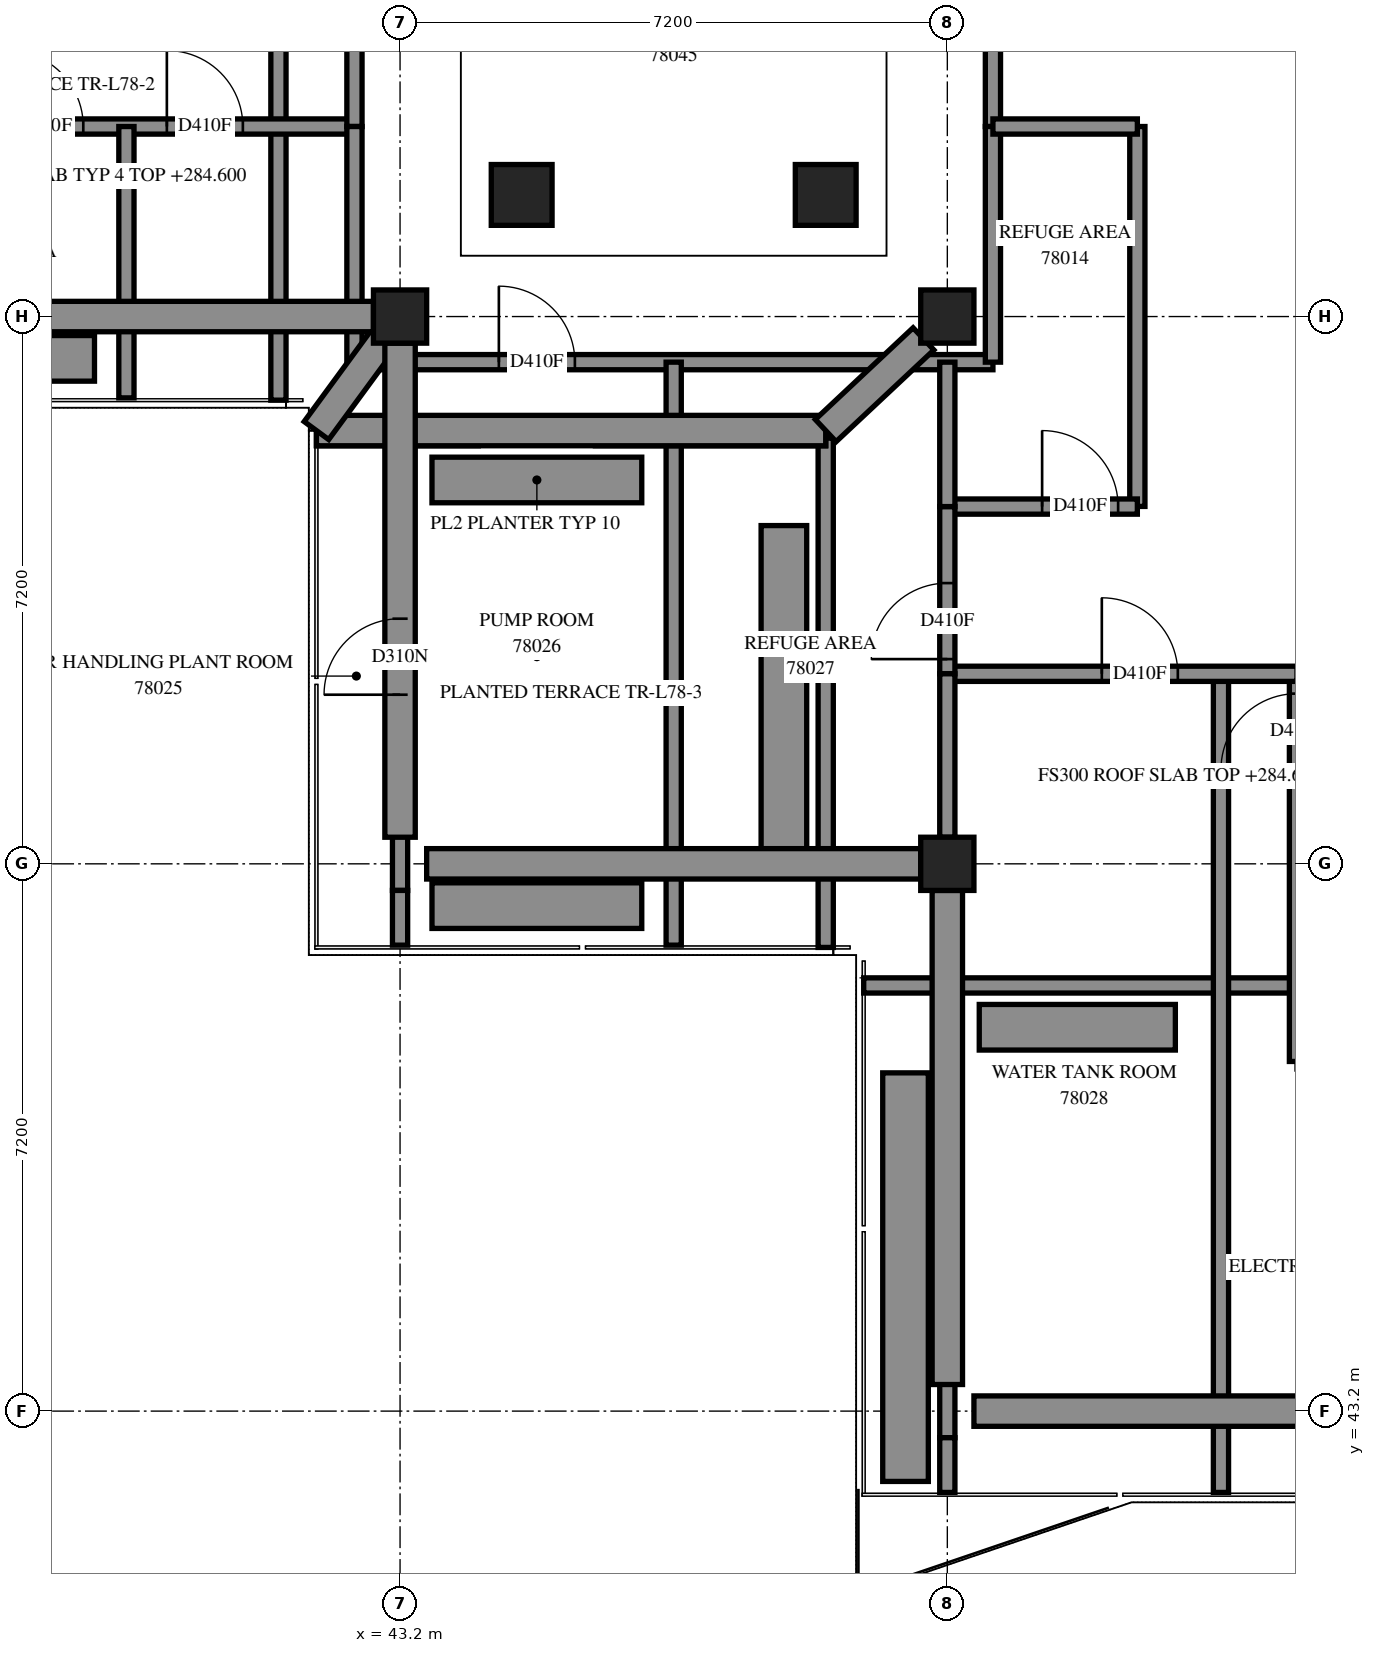
"""IFC4 building model, lengths in metres.
Left out: names, types, materials, properties, quantities, classifications, styles, units other than length and angle.
Written with IfcOpenShell. Run it as: python <this file> out.ifc"""

import sys

from ifc_helpers import new_model, si_unit, direction, frame, frame_2d, origin, origin_2d, place, context, subcontext, project, spatial, polyline, rectangle, outline, extrude, element, fill, save


model = new_model("IFC4")
c1 = context("Model", 3, precision=1e-05, world=origin(), true_north=direction((0.0, 1.0)))
c2 = subcontext(c1, "Body", "Model", "MODEL_VIEW")
j1 = project(units=[si_unit("LENGTHUNIT", "METRE"), si_unit("PLANEANGLEUNIT", "RADIAN")], contexts=[c1])
p1 = place(None, origin())
s1 = spatial("IfcSite", under=j1, at=p1, CompositionType="ELEMENT")
p2 = place(p1, origin())
s2 = spatial("IfcBuilding", under=s1, at=p2, CompositionType="ELEMENT")
p3 = place(p2, frame((0.0, 0.0, 284.6)))
s3 = spatial("IfcBuildingStorey", under=s2, at=p3, CompositionType="ELEMENT", Elevation=284.6)
for number, where, z_axis, x_axis in (
    (1, (43.2, 57.6, 0.0), (0.0, 0.0, 1.0), (1.0, 0.0, 0.0)),
    (2, (50.4, 50.4, 0.0), (0.0, 0.0, 1.0), (1.0, 0.0, 0.0)),
    (3, (50.4, 57.6, 0.0), (0.0, 0.0, 1.0), (1.0, 0.0, 0.0)),
):
    element("IfcColumn", number, at=place(p3, frame(where, z_axis=z_axis, x_axis=x_axis)), inside=s3, PredefinedType="COLUMN", context=c2, shape_type="SweptSolid", body=[
        extrude(rectangle(XDim=0.7, YDim=0.7, at=origin_2d()), origin(), (0.0, 0.0, 1.0), 5.7),
    ])
for number, where, z_axis, x_axis in (
    (4, (44.8, 59.2, 0.5), (0.0, 0.0, 1.0), (1.0, 0.0, 0.0)),
    (5, (48.8, 59.2, 0.5), (0.0, 0.0, 1.0), (1.0, 0.0, 0.0)),
):
    element("IfcColumn", number, at=place(p3, frame(where, z_axis=z_axis, x_axis=x_axis)), inside=s3, PredefinedType="COLUMN", context=c2, shape_type="SweptSolid", body=[
        extrude(rectangle(XDim=0.8, YDim=0.8, at=origin_2d()), origin(), (0.0, 0.0, 1.0), 2.6),
    ])
p4 = place(p3, frame((41.6, 56.5, 0.0), z_axis=(0.0, 0.0, 1.0), x_axis=(0.0, 1.0, 0.0)))
e6 = element("IfcWall", 6, at=p4, inside=s3, PredefinedType="PARAPET", context=c2, shape_type="SweptSolid", body=[
    extrude(outline(polyline([(0.0, -0.1), (6.8, -0.1), (6.6, 0.1), (0.0, 0.1), (0.0, -0.1)])), origin(), (0.0, 0.0, 1.0), 0.25),
])
p5 = place(p3, frame((36.42, 57.05, 0.0), z_axis=(0.0, 0.0, 1.0), x_axis=(1.0, 0.0, 0.0)))
e7 = element("IfcWall", 7, at=p5, inside=s3, PredefinedType="SOLIDWALL", context=c2, shape_type="SweptSolid", body=[
    extrude(rectangle(XDim=2.76, YDim=0.6, at=frame_2d((1.38, 0.0))), origin(), (0.0, 0.0, 1.0), 0.65),
])
p6 = place(p3, frame((48.8, 49.3, 0.0), z_axis=(0.0, 0.0, 1.0), x_axis=(0.0, 1.0, 0.0)))
e8 = element("IfcWall", 8, at=p6, inside=s3, PredefinedType="PARAPET", context=c2, shape_type="SweptSolid", body=[
    extrude(outline(polyline([(0.0, -0.1), (6.8, -0.1), (6.6, 0.1), (0.0, 0.1), (0.0, -0.1)])), origin(), (0.0, 0.0, 1.0), 0.25),
])
p7 = place(p3, frame((48.25, 50.45, 0.0), z_axis=(0.0, 0.0, 1.0), x_axis=(0.0, 1.0, 0.0)))
e9 = element("IfcWall", 9, at=p7, inside=s3, PredefinedType="SOLIDWALL", context=c2, shape_type="SweptSolid", body=[
    extrude(rectangle(XDim=4.4, YDim=0.6, at=frame_2d((2.2, 0.0))), origin(), (0.0, 0.0, 1.0), 0.65),
])
for number, where, z_axis, x_axis in (
    (10, (46.38, 55.45, 0.0), (0.0, 0.0, 1.0), (-1.0, 0.0, 0.0)),
    (11, (43.62, 49.85, 0.0), (0.0, 0.0, 1.0), (1.0, 0.0, 0.0)),
):
    element("IfcWall", number, at=place(p3, frame(where, z_axis=z_axis, x_axis=x_axis)), inside=s3, PredefinedType="SOLIDWALL", context=c2, shape_type="SweptSolid", body=[
        extrude(rectangle(XDim=2.76, YDim=0.6, at=frame_2d((1.38, 0.0))), origin(), (0.0, 0.0, 1.0), 0.65),
    ])
p8 = place(p3, frame((56.0, 48.8, 0.0), z_axis=(0.0, 0.0, 1.0), x_axis=(-1.0, 0.0, 0.0)))
e12 = element("IfcWall", 12, at=p8, inside=s3, PredefinedType="PARAPET", context=c2, shape_type="SweptSolid", body=[
    extrude(outline(polyline([(-0.1, -0.1), (6.7, -0.1), (6.7, 0.1), (0.1, 0.1), (-0.1, -0.1)])), origin(), (0.0, 0.0, 1.0), 0.25),
])
p9 = place(p3, frame((53.4, 48.25, 0.0), z_axis=(0.0, 0.0, 1.0), x_axis=(-1.0, 0.0, 0.0)))
e13 = element("IfcWall", 13, at=p9, inside=s3, PredefinedType="SOLIDWALL", context=c2, shape_type="SweptSolid", body=[
    extrude(rectangle(XDim=2.58, YDim=0.6, at=frame_2d((1.29, 0.0))), origin(), (0.0, 0.0, 1.0), 0.65),
])
p10 = place(p3, frame((49.85, 47.65, 0.0), z_axis=(0.0, 0.0, 1.0), x_axis=(0.0, -1.0, 0.0)))
e14 = element("IfcWall", 14, at=p10, inside=s3, PredefinedType="SOLIDWALL", context=c2, shape_type="SweptSolid", body=[
    extrude(rectangle(XDim=5.375, YDim=0.6, at=frame_2d((2.688, 0.0))), origin(), (0.0, 0.0, 1.0), 0.65),
])
p11 = place(p3, frame((54.0, 42.13, 0.0), z_axis=(0.0, 0.0, 1.0), x_axis=(0.0, 1.0, 0.0)))
e15 = element("IfcWall", 15, at=p11, inside=s3, PredefinedType="PARTITIONING", context=c2, shape_type="SweptSolid", body=[
    extrude(rectangle(XDim=10.77, YDim=0.2, at=frame_2d((5.385, 0.0))), origin(), (0.0, 0.0, 1.0), 5.7),
])
p12 = place(p3, frame((42.6, 57.0, 0.0), z_axis=(0.0, 0.0, 1.0), x_axis=(1.0, 0.0, 0.0)))
e16 = element("IfcWall", 16, at=p12, inside=s3, PredefinedType="PARTITIONING", context=c2, shape_type="SweptSolid", body=[
    extrude(rectangle(XDim=8.4, YDim=0.2, at=frame_2d((4.2, 0.0))), origin(), (0.0, 0.0, 1.0), 5.2),
])
p13 = place(p12, frame((1.9, 0.0, 0.0)))
e17 = element("IfcOpeningElement", 17, at=p13, cuts=e16, PredefinedType="OPENING", context=c2, shape_type="SweptSolid", body=[
    extrude(rectangle(XDim=1.0, YDim=2.1, at=frame_2d((0.5, 1.05))), frame((0.0, 0.11, 0.0), z_axis=(0.0, -1.0, 0.0), x_axis=(1.0, 0.0, 0.0)), (0.0, 0.0, 1.0), 0.22),
])
p14 = place(p3, frame((46.8, 49.33, 0.0), z_axis=(0.0, 0.0, 1.0), x_axis=(0.0, 1.0, 0.0)))
e18 = element("IfcWall", 18, at=p14, inside=s3, PredefinedType="PARTITIONING", context=c2, shape_type="SweptSolid", body=[
    extrude(rectangle(XDim=7.67, YDim=0.2, at=frame_2d((3.835, 0.0))), origin(), (0.0, 0.0, 1.0), 5.7),
])
p15 = place(p3, frame((36.0, 60.1, 0.0), z_axis=(0.0, 0.0, 1.0), x_axis=(1.0, 0.0, 0.0)))
e19 = element("IfcWall", 19, at=p15, inside=s3, PredefinedType="PARTITIONING", context=c2, shape_type="SweptSolid", body=[
    extrude(rectangle(XDim=6.6, YDim=0.2, at=frame_2d((3.3, 0.0))), origin(), (0.0, 0.0, 1.0), 5.7),
])
p16 = place(p15, frame((2.033, 0.0, 0.0)))
e20 = element("IfcOpeningElement", 20, at=p16, cuts=e19, PredefinedType="OPENING", context=c2, shape_type="SweptSolid", body=[
    extrude(rectangle(XDim=1.0, YDim=2.1, at=frame_2d((0.5, 1.05))), frame((0.0, 0.11, 0.0), z_axis=(0.0, -1.0, 0.0), x_axis=(1.0, 0.0, 0.0)), (0.0, 0.0, 1.0), 0.22),
])
p17 = place(p15, frame((4.132, 0.0, 0.0)))
e21 = element("IfcOpeningElement", 21, at=p17, cuts=e19, PredefinedType="OPENING", context=c2, shape_type="SweptSolid", body=[
    extrude(rectangle(XDim=1.0, YDim=2.1, at=frame_2d((0.5, 1.05))), frame((0.0, 0.11, 0.0), z_axis=(0.0, -1.0, 0.0), x_axis=(1.0, 0.0, 0.0)), (0.0, 0.0, 1.0), 0.22),
])
p18 = place(p3, frame((50.4, 42.85, 0.0), z_axis=(0.0, 0.0, 1.0), x_axis=(0.0, 1.0, 0.0)))
e22 = element("IfcWall", 22, at=p18, inside=s3, PredefinedType="PARTITIONING", context=c2, shape_type="SweptSolid", body=[
    extrude(rectangle(XDim=7.9, YDim=0.2, at=frame_2d((3.95, 0.0))), origin(), (0.0, 0.0, 1.0), 5.7),
])
p19 = place(p3, frame((43.2, 50.05, 0.0), z_axis=(0.0, 0.0, 1.0), x_axis=(0.0, 1.0, 0.0)))
e23 = element("IfcWall", 23, at=p19, inside=s3, PredefinedType="PARTITIONING", context=c2, shape_type="SweptSolid", body=[
    extrude(rectangle(XDim=6.95, YDim=0.2, at=frame_2d((3.475, 0.0))), origin(), (0.0, 0.0, 1.0), 5.7),
])
p20 = place(p19, frame((2.575, 0.0, 0.0)))
e24 = element("IfcOpeningElement", 24, at=p20, cuts=e23, PredefinedType="OPENING", context=c2, shape_type="SweptSolid", body=[
    extrude(rectangle(XDim=1.0, YDim=2.1, at=frame_2d((0.5, 1.05))), frame((0.0, 0.11, 0.0), z_axis=(0.0, -1.0, 0.0), x_axis=(1.0, 0.0, 0.0)), (0.0, 0.0, 1.0), 0.22),
])
p21 = place(p3, frame((51.0, 60.1, 0.0), z_axis=(0.0, 0.0, 1.0), x_axis=(0.0, 1.0, 0.0)))
e25 = element("IfcWall", 25, at=p21, inside=s3, PredefinedType="PARTITIONING", context=c2, shape_type="SweptSolid", body=[
    extrude(rectangle(XDim=5.3, YDim=0.2, at=frame_2d((2.65, 0.0))), origin(), (0.0, 0.0, 1.0), 5.7),
])
p22 = place(p3, frame((42.6, 60.1, 0.0), z_axis=(0.0, 0.0, 1.0), x_axis=(0.0, 1.0, 0.0)))
e26 = element("IfcWall", 26, at=p22, inside=s3, PredefinedType="PARTITIONING", context=c2, shape_type="SweptSolid", body=[
    extrude(rectangle(XDim=5.3, YDim=0.2, at=frame_2d((2.65, 0.0))), origin(), (0.0, 0.0, 1.0), 5.2),
])
p23 = place(p3, frame((55.0, 47.8, 0.0), z_axis=(0.0, 0.0, 1.0), x_axis=(0.0, 1.0, 0.0)))
e27 = element("IfcWall", 27, at=p23, inside=s3, PredefinedType="PARTITIONING", context=c2, shape_type="SweptSolid", body=[
    extrude(rectangle(XDim=5.1, YDim=0.2, at=frame_2d((2.55, 0.0))), origin(), (0.0, 0.0, 1.0), 5.7),
])
p24 = place(p23, frame((3.839, 0.0, 0.0)))
e28 = element("IfcOpeningElement", 28, at=p24, cuts=e27, PredefinedType="OPENING", context=c2, shape_type="SweptSolid", body=[
    extrude(rectangle(XDim=1.0, YDim=2.1, at=frame_2d((0.5, 1.05))), frame((0.0, 0.11, 0.0), z_axis=(0.0, -1.0, 0.0), x_axis=(1.0, 0.0, 0.0)), (0.0, 0.0, 1.0), 0.22),
])
p25 = place(p3, frame((52.9, 55.102, 0.0), z_axis=(0.0, 0.0, 1.0), x_axis=(0.0, 1.0, 0.0)))
e29 = element("IfcWall", 29, at=p25, inside=s3, PredefinedType="PARTITIONING", context=c2, shape_type="SweptSolid", body=[
    extrude(rectangle(XDim=4.998, YDim=0.2, at=frame_2d((2.499, 0.0))), origin(), (0.0, 0.0, 1.0), 5.7),
])
p26 = place(p3, frame((50.4, 52.9, 0.0), z_axis=(0.0, 0.0, 1.0), x_axis=(1.0, 0.0, 0.0)))
e30 = element("IfcWall", 30, at=p26, inside=s3, PredefinedType="PARTITIONING", context=c2, shape_type="SweptSolid", body=[
    extrude(rectangle(XDim=4.6, YDim=0.2, at=frame_2d((2.3, 0.0))), origin(), (0.0, 0.0, 1.0), 5.7),
])
p27 = place(p26, frame((2.033, 0.0, 0.0)))
e31 = element("IfcOpeningElement", 31, at=p27, cuts=e30, PredefinedType="OPENING", context=c2, shape_type="SweptSolid", body=[
    extrude(rectangle(XDim=1.0, YDim=2.1, at=frame_2d((0.5, 1.05))), frame((0.0, 0.11, 0.0), z_axis=(0.0, -1.0, 0.0), x_axis=(1.0, 0.0, 0.0)), (0.0, 0.0, 1.0), 0.22),
])
p28 = place(p3, frame((39.6, 56.53, 0.0), z_axis=(0.0, 0.0, 1.0), x_axis=(0.0, 1.0, 0.0)))
e32 = element("IfcWall", 32, at=p28, inside=s3, PredefinedType="PARTITIONING", context=c2, shape_type="SweptSolid", body=[
    extrude(rectangle(XDim=3.57, YDim=0.2, at=frame_2d((1.785, 0.0))), origin(), (0.0, 0.0, 1.0), 5.7),
])
for number, where, z_axis, x_axis in (
    (33, (42.6, 57.0, 0.0), (0.0, 0.0, 1.0), (0.0, 1.0, 0.0)),
    (34, (51.0, 57.0, 0.0), (0.0, 0.0, 1.0), (0.0, 1.0, 0.0)),
):
    element("IfcWall", number, at=place(p3, frame(where, z_axis=z_axis, x_axis=x_axis)), inside=s3, PredefinedType="PARTITIONING", context=c2, shape_type="SweptSolid", body=[
        extrude(rectangle(XDim=3.1, YDim=0.2, at=frame_2d((1.55, 0.0))), origin(), (0.0, 0.0, 1.0), 5.7),
    ])
p29 = place(p3, frame((50.4, 55.1, 0.0), z_axis=(0.0, 0.0, 1.0), x_axis=(1.0, 0.0, 0.0)))
e35 = element("IfcWall", 35, at=p29, inside=s3, PredefinedType="PARTITIONING", context=c2, shape_type="SweptSolid", body=[
    extrude(rectangle(XDim=2.5, YDim=0.2, at=frame_2d((1.25, 0.0))), origin(), (0.0, 0.0, 1.0), 5.7),
])
p30 = place(p29, frame((1.247, 0.0, 0.0)))
e36 = element("IfcOpeningElement", 36, at=p30, cuts=e35, PredefinedType="OPENING", context=c2, shape_type="SweptSolid", body=[
    extrude(rectangle(XDim=1.0, YDim=2.1, at=frame_2d((0.5, 1.05))), frame((0.0, 0.11, 0.0), z_axis=(0.0, -1.0, 0.0), x_axis=(1.0, 0.0, 0.0)), (0.0, 0.0, 1.0), 0.22),
])
p31 = place(p3, frame((50.4, 52.9, 0.0), z_axis=(0.0, 0.0, 1.0), x_axis=(0.0, 1.0, 0.0)))
e37 = element("IfcWall", 37, at=p31, inside=s3, PredefinedType="PARTITIONING", context=c2, shape_type="SweptSolid", body=[
    extrude(rectangle(XDim=2.2, YDim=0.2, at=frame_2d((1.1, 0.0))), origin(), (0.0, 0.0, 1.0), 5.2),
])
p32 = place(p31, frame((0.193, 0.0, 0.0)))
e38 = element("IfcOpeningElement", 38, at=p32, cuts=e37, PredefinedType="OPENING", context=c2, shape_type="SweptSolid", body=[
    extrude(rectangle(XDim=1.0, YDim=2.1, at=frame_2d((0.5, 1.05))), frame((0.0, 0.11, 0.0), z_axis=(0.0, -1.0, 0.0), x_axis=(1.0, 0.0, 0.0)), (0.0, 0.0, 1.0), 0.22),
])
p33 = place(p3, frame((50.4, 50.75, 0.0), z_axis=(0.0, 0.0, 1.0), x_axis=(0.0, 1.0, 0.0)))
e39 = element("IfcWall", 39, at=p33, inside=s3, PredefinedType="PARTITIONING", context=c2, shape_type="SweptSolid", body=[
    extrude(rectangle(XDim=2.15, YDim=0.2, at=frame_2d((1.075, 0.0))), origin(), (0.0, 0.0, 1.0), 5.2),
])
p34 = place(p3, frame((51.0, 60.1, 0.0), z_axis=(0.0, 0.0, 1.0), x_axis=(1.0, 0.0, 0.0)))
e40 = element("IfcWall", 40, at=p34, inside=s3, PredefinedType="PARTITIONING", context=c2, shape_type="SweptSolid", body=[
    extrude(rectangle(XDim=1.9, YDim=0.2, at=frame_2d((0.95, 0.0))), origin(), (0.0, 0.0, 1.0), 5.7),
])
p35 = place(p3, frame((50.4, 55.1, 0.0), z_axis=(0.0, 0.0, 1.0), x_axis=(0.0, 1.0, 0.0)))
e41 = element("IfcWall", 41, at=p35, inside=s3, PredefinedType="PARTITIONING", context=c2, shape_type="SweptSolid", body=[
    extrude(rectangle(XDim=1.9, YDim=0.2, at=frame_2d((0.95, 0.0))), origin(), (0.0, 0.0, 1.0), 5.2),
])
for number, where, z_axis, x_axis in (
    (42, (43.2, 49.33, 0.0), (0.0, 0.0, 1.0), (0.0, 1.0, 0.0)),
    (43, (50.4, 42.13, 0.0), (0.0, 0.0, 1.0), (0.0, 1.0, 0.0)),
):
    element("IfcWall", number, at=place(p3, frame(where, z_axis=z_axis, x_axis=x_axis)), inside=s3, PredefinedType="PARTITIONING", context=c2, shape_type="SweptSolid", body=[
        extrude(rectangle(XDim=0.72, YDim=0.2, at=frame_2d((0.36, 0.0))), origin(), (0.0, 0.0, 1.0), 5.7),
    ])
p36 = place(p3, frame((48.8, 56.0, 0.0), z_axis=(0.0, 0.0, 1.0), x_axis=(-1.0, 0.0, 0.0)))
e44 = element("IfcWall", 44, at=p36, inside=s3, PredefinedType="PARAPET", context=c2, shape_type="SweptSolid", body=[
    extrude(outline(polyline([(-0.1, -0.1), (3.03, -0.1), (3.03, 0.1), (0.1, 0.1), (-0.1, -0.1)])), origin(), (0.0, 0.0, 1.0), 0.25),
])
p37 = place(p3, frame((44.23, 56.0, 0.0), z_axis=(0.0, 0.0, 1.0), x_axis=(-1.0, 0.0, 0.0)))
e45 = element("IfcWall", 45, at=p37, inside=s3, PredefinedType="PARAPET", context=c2, shape_type="SweptSolid", body=[
    extrude(outline(polyline([(0.0, -0.1), (2.13, -0.1), (2.13, 0.1), (0.0, 0.1), (0.0, -0.1)])), origin(), (0.0, 0.0, 1.0), 0.25),
])
p38 = place(p30, origin())
e46 = element("IfcDoor", 46, at=p38, inside=s3, OperationType="SINGLE_SWING_RIGHT", PredefinedType="DOOR", context=c2, shape_type="SweptSolid", body=[
    extrude(rectangle(XDim=1.0, YDim=2.1, at=frame_2d((0.5, 1.05))), frame((0.0, 0.025, 0.0), z_axis=(0.0, -1.0, 0.0), x_axis=(1.0, 0.0, 0.0)), (0.0, 0.0, 1.0), 0.05),
])
fill(e36, e46)
p39 = place(p16, origin())
e47 = element("IfcDoor", 47, at=p39, inside=s3, OperationType="SINGLE_SWING_LEFT", PredefinedType="DOOR", context=c2, shape_type="SweptSolid", body=[
    extrude(rectangle(XDim=1.0, YDim=2.1, at=frame_2d((0.5, 1.05))), frame((0.0, 0.025, 0.0), z_axis=(0.0, -1.0, 0.0), x_axis=(1.0, 0.0, 0.0)), (0.0, 0.0, 1.0), 0.05),
])
fill(e20, e47)
p40 = place(p17, origin())
e48 = element("IfcDoor", 48, at=p40, inside=s3, OperationType="SINGLE_SWING_RIGHT", PredefinedType="DOOR", context=c2, shape_type="SweptSolid", body=[
    extrude(rectangle(XDim=1.0, YDim=2.1, at=frame_2d((0.5, 1.05))), frame((0.0, 0.025, 0.0), z_axis=(0.0, -1.0, 0.0), x_axis=(1.0, 0.0, 0.0)), (0.0, 0.0, 1.0), 0.05),
])
fill(e21, e48)
p41 = place(p32, origin())
e49 = element("IfcDoor", 49, at=p41, inside=s3, OperationType="SINGLE_SWING_LEFT", PredefinedType="DOOR", context=c2, shape_type="SweptSolid", body=[
    extrude(rectangle(XDim=1.0, YDim=2.1, at=frame_2d((0.5, 1.05))), frame((0.0, 0.025, 0.0), z_axis=(0.0, -1.0, 0.0), x_axis=(1.0, 0.0, 0.0)), (0.0, 0.0, 1.0), 0.05),
])
fill(e38, e49)
p42 = place(p27, origin())
e50 = element("IfcDoor", 50, at=p42, inside=s3, OperationType="SINGLE_SWING_LEFT", PredefinedType="DOOR", context=c2, shape_type="SweptSolid", body=[
    extrude(rectangle(XDim=1.0, YDim=2.1, at=frame_2d((0.5, 1.05))), frame((0.0, 0.025, 0.0), z_axis=(0.0, -1.0, 0.0), x_axis=(1.0, 0.0, 0.0)), (0.0, 0.0, 1.0), 0.05),
])
fill(e31, e50)
p43 = place(p24, origin())
e51 = element("IfcDoor", 51, at=p43, inside=s3, OperationType="SINGLE_SWING_RIGHT", PredefinedType="DOOR", context=c2, shape_type="SweptSolid", body=[
    extrude(rectangle(XDim=1.0, YDim=2.1, at=frame_2d((0.5, 1.05))), frame((0.0, 0.025, 0.0), z_axis=(0.0, -1.0, 0.0), x_axis=(1.0, 0.0, 0.0)), (0.0, 0.0, 1.0), 0.05),
])
fill(e28, e51)
p44 = place(p13, origin())
e52 = element("IfcDoor", 52, at=p44, inside=s3, OperationType="SINGLE_SWING_LEFT", PredefinedType="DOOR", context=c2, shape_type="SweptSolid", body=[
    extrude(rectangle(XDim=1.0, YDim=2.1, at=frame_2d((0.5, 1.05))), frame((0.0, 0.025, 0.0), z_axis=(0.0, -1.0, 0.0), x_axis=(1.0, 0.0, 0.0)), (0.0, 0.0, 1.0), 0.05),
])
fill(e17, e52)
p45 = place(p20, origin())
e53 = element("IfcDoor", 53, at=p45, inside=s3, OperationType="SINGLE_SWING_LEFT", PredefinedType="DOOR", context=c2, shape_type="SweptSolid", body=[
    extrude(rectangle(XDim=1.0, YDim=2.1, at=frame_2d((0.5, 1.05))), frame((0.0, 0.025, 0.0), z_axis=(0.0, -1.0, 0.0), x_axis=(1.0, 0.0, 0.0)), (0.0, 0.0, 1.0), 0.05),
])
fill(e24, e53)
save(model, sys.argv[1])
